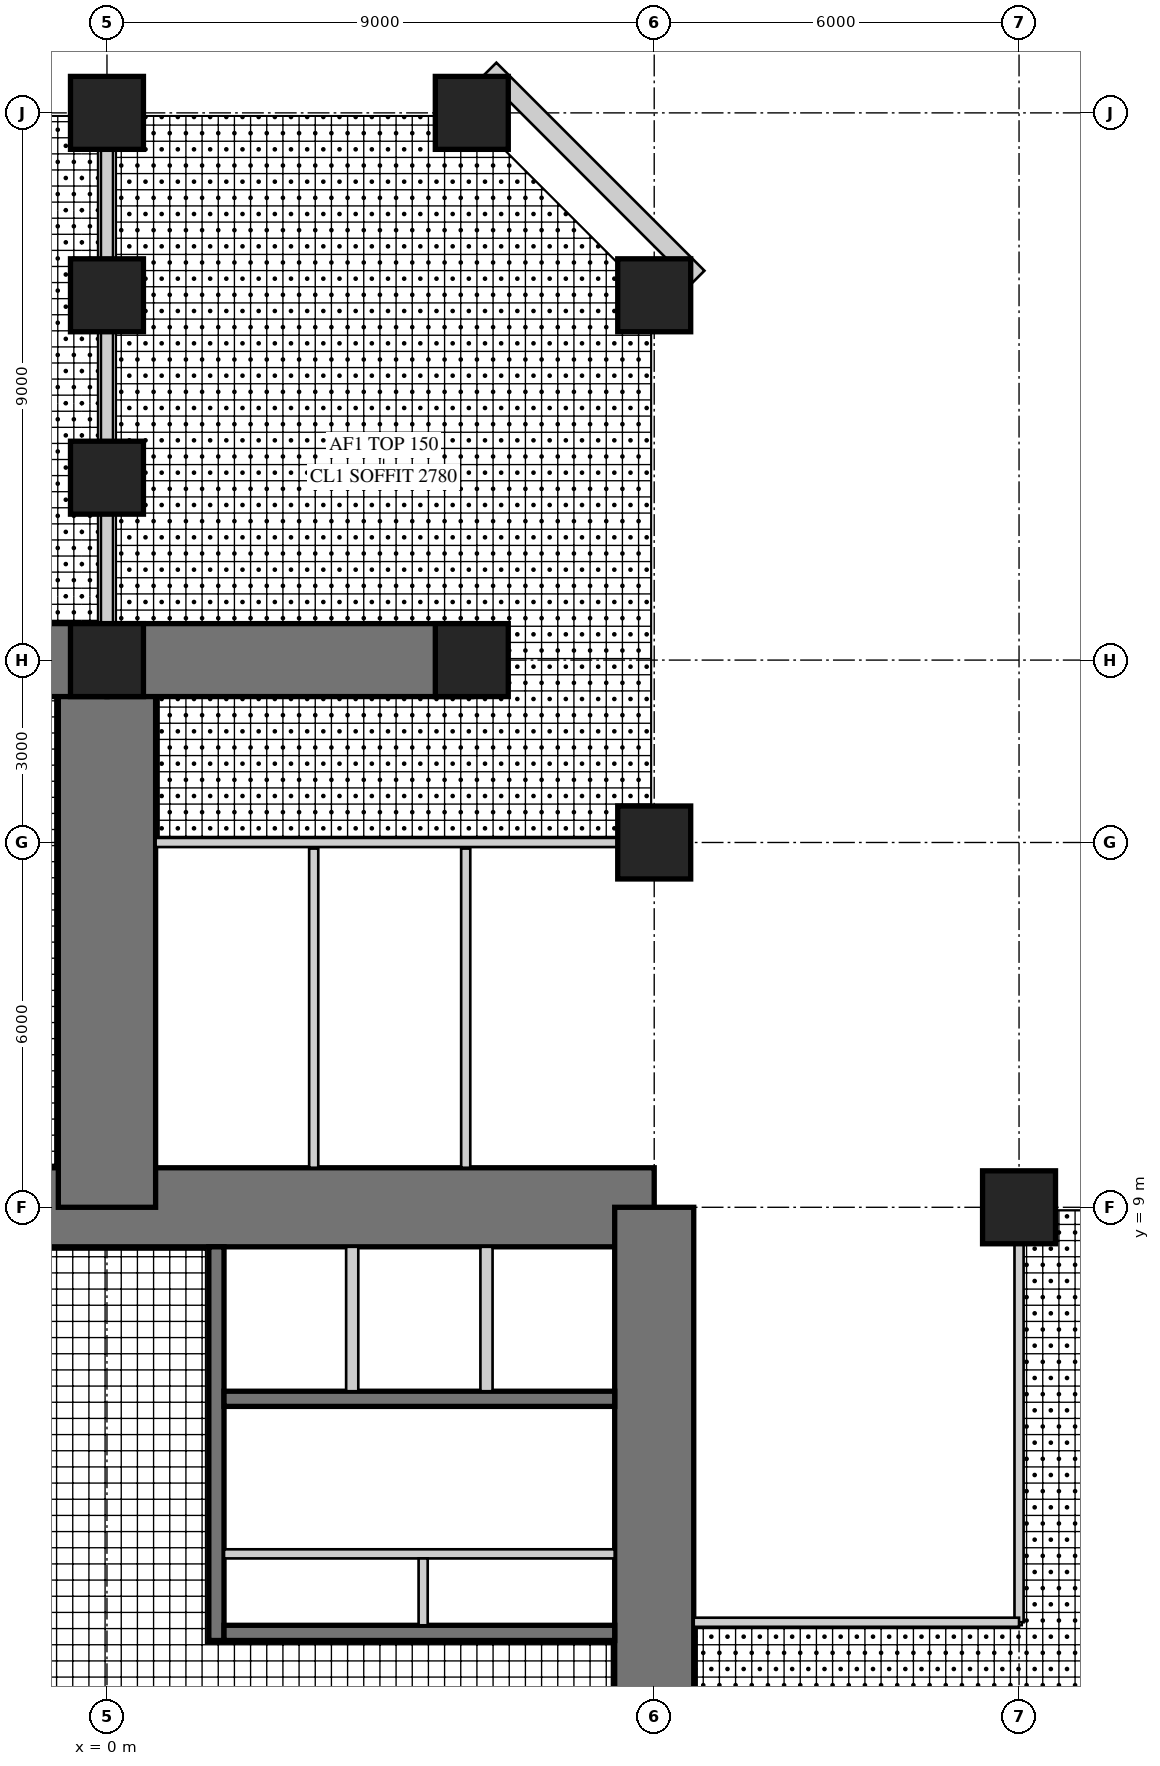
"""IFC4 building model, lengths in metres.
Left out: names, types, materials, properties, quantities, classifications, styles, units other than length and angle.
Written with IfcOpenShell. Run it as: python <this file> out.ifc"""

import sys

from ifc_helpers import new_model, si_unit, direction, frame, frame_2d, origin, origin_2d, place, context, subcontext, project, spatial, rectangle, hollow_rectangle, extrude, element, fill, save


model = new_model("IFC4")
c1 = context("Model", 3, precision=1e-05, world=origin(), true_north=direction((0.0, 1.0)))
c2 = subcontext(c1, "Body", "Model", "MODEL_VIEW")
j1 = project(units=[si_unit("LENGTHUNIT", "METRE"), si_unit("PLANEANGLEUNIT", "RADIAN")], contexts=[c1])
p1 = place(None, origin())
s1 = spatial("IfcSite", under=j1, at=p1, CompositionType="ELEMENT")
p2 = place(p1, origin())
s2 = spatial("IfcBuilding", under=s1, at=p2, CompositionType="ELEMENT")
p3 = place(p2, frame((0.0, 0.0, 71.5)))
s3 = spatial("IfcBuildingStorey", under=s2, at=p3, CompositionType="ELEMENT", Elevation=71.5)
p4 = place(p3, frame((9.0, 9.0, 0.0), z_axis=(0.0, 0.0, 1.0), x_axis=(-1.0, 0.0, 0.0)))
e1 = element("IfcWall", 1, at=p4, inside=s3, PredefinedType="SHEAR", context=c2, shape_type="SweptSolid", body=[
    extrude(rectangle(XDim=18.0, YDim=1.3, at=frame_2d((9.0, 0.0))), origin(), (0.0, 0.0, 1.0), 4.0),
])
p5 = place(p4, frame((9.8, 0.0, 0.0)))
e2 = element("IfcOpeningElement", 2, at=p5, cuts=e1, PredefinedType="OPENING", context=c2, shape_type="SweptSolid", body=[
    extrude(rectangle(XDim=1.0, YDim=2.4, at=frame_2d((0.5, 1.2))), frame((0.0, 0.66, 0.0), z_axis=(0.0, -1.0, 0.0), x_axis=(1.0, 0.0, 0.0)), (0.0, 0.0, 1.0), 1.32),
])
p6 = place(p3, frame((9.0, -9.0, 0.0), z_axis=(0.0, 0.0, 1.0), x_axis=(0.0, 1.0, 0.0)))
e3 = element("IfcWall", 3, at=p6, inside=s3, PredefinedType="SHEAR", context=c2, shape_type="SweptSolid", body=[
    extrude(rectangle(XDim=18.0, YDim=1.3, at=frame_2d((9.0, 0.0))), origin(), (0.0, 0.0, 1.0), 4.0),
])
p7 = place(p6, frame((9.8, 0.0, 0.0)))
e4 = element("IfcOpeningElement", 4, at=p7, cuts=e3, PredefinedType="OPENING", context=c2, shape_type="SweptSolid", body=[
    extrude(rectangle(XDim=1.0, YDim=2.4, at=frame_2d((0.5, 1.2))), frame((0.0, 0.66, 0.0), z_axis=(0.0, -1.0, 0.0), x_axis=(1.0, 0.0, 0.0)), (0.0, 0.0, 1.0), 1.32),
])
p8 = place(p3, frame((1.8, 1.875, 0.0), z_axis=(0.0, 0.0, 1.0), x_axis=(0.0, 1.0, 0.0)))
e5 = element("IfcWall", 5, at=p8, inside=s3, PredefinedType="SHEAR", context=c2, shape_type="SweptSolid", body=[
    extrude(rectangle(XDim=6.475, YDim=0.25, at=frame_2d((3.238, 0.0))), origin(), (0.0, 0.0, 1.0), 4.0),
])
p9 = place(p8, frame((1.875, 0.0, 0.0)))
e6 = element("IfcOpeningElement", 6, at=p9, cuts=e5, PredefinedType="OPENING", context=c2, shape_type="SweptSolid", body=[
    extrude(rectangle(XDim=1.6, YDim=2.4, at=frame_2d((0.8, 1.2))), frame((0.0, 0.135, 0.0), z_axis=(0.0, -1.0, 0.0), x_axis=(1.0, 0.0, 0.0)), (0.0, 0.0, 1.0), 0.27),
])
p10 = place(p3, frame((1.925, 2.0, 0.0), z_axis=(0.0, 0.0, 1.0), x_axis=(1.0, 0.0, 0.0)))
e7 = element("IfcWall", 7, at=p10, inside=s3, PredefinedType="SHEAR", context=c2, shape_type="SweptSolid", body=[
    extrude(rectangle(XDim=6.425, YDim=0.25, at=frame_2d((3.212, 0.0))), origin(), (0.0, 0.0, 1.0), 4.0),
])
p11 = place(p3, frame((1.925, 5.85, 0.0), z_axis=(0.0, 0.0, 1.0), x_axis=(1.0, 0.0, 0.0)))
e8 = element("IfcWall", 8, at=p11, inside=s3, PredefinedType="SHEAR", context=c2, shape_type="SweptSolid", body=[
    extrude(rectangle(XDim=6.425, YDim=0.25, at=frame_2d((3.212, 0.0))), origin(), (0.0, 0.0, 1.0), 4.0),
])
p12 = place(p11, frame((0.454, 0.0, 0.0)))
e9 = element("IfcOpeningElement", 9, at=p12, cuts=e8, PredefinedType="OPENING", context=c2, shape_type="SweptSolid", body=[
    extrude(rectangle(XDim=1.1, YDim=2.2, at=frame_2d((0.55, 1.1))), frame((0.0, 0.135, 0.0), z_axis=(0.0, -1.0, 0.0), x_axis=(1.0, 0.0, 0.0)), (0.0, 0.0, 1.0), 0.27),
])
p13 = place(p11, frame((2.663, 0.0, 0.0)))
e10 = element("IfcOpeningElement", 10, at=p13, cuts=e8, PredefinedType="OPENING", context=c2, shape_type="SweptSolid", body=[
    extrude(rectangle(XDim=1.1, YDim=2.2, at=frame_2d((0.55, 1.1))), frame((0.0, 0.135, 0.0), z_axis=(0.0, -1.0, 0.0), x_axis=(1.0, 0.0, 0.0)), (0.0, 0.0, 1.0), 0.27),
])
p14 = place(p11, frame((4.871, 0.0, 0.0)))
e11 = element("IfcOpeningElement", 11, at=p14, cuts=e8, PredefinedType="OPENING", context=c2, shape_type="SweptSolid", body=[
    extrude(rectangle(XDim=1.1, YDim=2.2, at=frame_2d((0.55, 1.1))), frame((0.0, 0.135, 0.0), z_axis=(0.0, -1.0, 0.0), x_axis=(1.0, 0.0, 0.0)), (0.0, 0.0, 1.0), 0.27),
])
p15 = place(p3, frame((1.925, 3.3, 0.0), z_axis=(0.0, 0.0, 1.0), x_axis=(1.0, 0.0, 0.0)))
e12 = element("IfcWall", 12, at=p15, inside=s3, PredefinedType="PARTITIONING", context=c2, shape_type="SweptSolid", body=[
    extrude(rectangle(XDim=6.425, YDim=0.15, at=frame_2d((3.212, 0.0))), origin(), (0.0, 0.0, 1.0), 4.0),
])
p16 = place(p15, frame((0.075, 0.0, 0.0)))
e13 = element("IfcOpeningElement", 13, at=p16, cuts=e12, PredefinedType="OPENING", context=c2, shape_type="SweptSolid", body=[
    extrude(rectangle(XDim=0.8, YDim=2.1, at=frame_2d((0.4, 1.05))), frame((0.0, 0.085, 0.0), z_axis=(0.0, -1.0, 0.0), x_axis=(1.0, 0.0, 0.0)), (0.0, 0.0, 1.0), 0.17),
])
p17 = place(p15, frame((3.675, 0.0, 0.0)))
e14 = element("IfcOpeningElement", 14, at=p17, cuts=e12, PredefinedType="OPENING", context=c2, shape_type="SweptSolid", body=[
    extrude(rectangle(XDim=0.8, YDim=2.1, at=frame_2d((0.4, 1.05))), frame((0.0, 0.085, 0.0), z_axis=(0.0, -1.0, 0.0), x_axis=(1.0, 0.0, 0.0)), (0.0, 0.0, 1.0), 0.17),
])
p18 = place(p3, frame((5.2, 2.125, 0.0), z_axis=(0.0, 0.0, 1.0), x_axis=(0.0, 1.0, 0.0)))
e15 = element("IfcWall", 15, at=p18, inside=s3, PredefinedType="PARTITIONING", context=c2, shape_type="SweptSolid", body=[
    extrude(rectangle(XDim=1.1, YDim=0.15, at=frame_2d((0.55, 0.0))), origin(), (0.0, 0.0, 1.0), 4.0),
])
for number, where, z_axis, x_axis in (
    (16, (4.033, 5.975, 0.0), (0.0, 0.0, 1.0), (0.0, 1.0, 0.0)),
    (17, (6.242, 5.975, 0.0), (0.0, 0.0, 1.0), (0.0, 1.0, 0.0)),
):
    element("IfcWall", number, at=place(p3, frame(where, z_axis=z_axis, x_axis=x_axis)), inside=s3, PredefinedType="PARTITIONING", context=c2, shape_type="SweptSolid", body=[
        extrude(rectangle(XDim=2.375, YDim=0.2, at=frame_2d((1.188, 0.0))), origin(), (0.0, 0.0, 1.0), 4.0),
    ])
p19 = place(p3, frame((0.0, 9.0, 0.0), z_axis=(0.0, 0.0, 1.0), x_axis=(0.0, 1.0, 0.0)))
e18 = element("IfcWall", 18, at=p19, inside=s3, PredefinedType="SHEAR", context=c2, shape_type="SweptSolid", body=[
    extrude(rectangle(XDim=9.0, YDim=1.6, at=frame_2d((4.5, 0.0))), origin(), (0.0, 0.0, 1.0), 4.0),
])
for number, where, z_axis, x_axis in (
    (19, (0.0, 18.0, 0.0), (0.0, 0.0, 1.0), (-1.0, 0.0, 0.0)),
    (20, (0.0, 18.0, 0.0), (0.0, 0.0, 1.0), (1.0, 0.0, 0.0)),
):
    element("IfcWall", number, at=place(p3, frame(where, z_axis=z_axis, x_axis=x_axis)), inside=s3, PredefinedType="SHEAR", context=c2, shape_type="SweptSolid", body=[
        extrude(rectangle(XDim=6.0, YDim=1.2, at=frame_2d((3.0, 0.0))), origin(), (0.0, 0.0, 1.0), 4.0),
    ])
for number, where, z_axis, x_axis in (
    (21, (9.0, 15.0, 0.0), (0.0, 0.0, 1.0), (1.0, 0.0, 0.0)),
    (22, (9.0, 24.0, 0.0), (0.0, 0.0, 1.0), (1.0, 0.0, 0.0)),
    (23, (6.0, 27.0, 0.0), (0.0, 0.0, 1.0), (1.0, 0.0, 0.0)),
    (24, (0.0, 27.0, 0.0), (0.0, 0.0, 1.0), (1.0, 0.0, 0.0)),
    (25, (15.0, 9.0, 0.0), (0.0, 0.0, 1.0), (1.0, 0.0, 0.0)),
    (26, (6.0, 18.0, 0.0), (0.0, 0.0, 1.0), (1.0, 0.0, 0.0)),
    (27, (0.0, 18.0, 0.0), (0.0, 0.0, 1.0), (1.0, 0.0, 0.0)),
    (28, (0.0, 21.0, 0.0), (0.0, 0.0, 1.0), (1.0, 0.0, 0.0)),
    (29, (0.0, 24.0, 0.0), (0.0, 0.0, 1.0), (1.0, 0.0, 0.0)),
):
    element("IfcColumn", number, at=place(p3, frame(where, z_axis=z_axis, x_axis=x_axis)), inside=s3, PredefinedType="COLUMN", context=c2, shape_type="SweptSolid", body=[
        extrude(rectangle(XDim=1.2, YDim=1.2, at=origin_2d()), origin(), (0.0, 0.0, 1.0), 4.0),
    ])
p20 = place(p3, frame((9.72, 24.298, 0.0), z_axis=(0.0, 0.0, 1.0), x_axis=(-0.707106781187, 0.707106781187, 0.0)))
e30 = element("IfcWall", 30, at=p20, inside=s3, PredefinedType="SOLIDWALL", context=c2, shape_type="SweptSolid", body=[
    extrude(rectangle(XDim=4.839, YDim=0.3, at=frame_2d((2.419, 0.0))), origin(), (0.0, 0.0, 1.0), 3.8),
])
p21 = place(p20, frame((1.969, 0.0, 0.3)))
e31 = element("IfcOpeningElement", 31, at=p21, cuts=e30, PredefinedType="OPENING", context=c2, shape_type="SweptSolid", body=[
    extrude(rectangle(XDim=0.9, YDim=2.4, at=frame_2d((0.45, 1.2))), frame((0.0, 0.16, 0.0), z_axis=(0.0, -1.0, 0.0), x_axis=(1.0, 0.0, 0.0)), (0.0, 0.0, 1.0), 0.32),
])
p22 = place(p3, frame((8.4, 15.0, 0.0), z_axis=(0.0, 0.0, 1.0), x_axis=(-1.0, 0.0, 0.0)))
e32 = element("IfcWall", 32, at=p22, inside=s3, PredefinedType="PARTITIONING", context=c2, shape_type="SweptSolid", body=[
    extrude(rectangle(XDim=7.6, YDim=0.15, at=frame_2d((3.8, 0.0))), origin(), (0.0, 0.0, 1.0), 2.95),
])
p23 = place(p22, frame((0.75, 0.0, 0.0)))
e33 = element("IfcOpeningElement", 33, at=p23, cuts=e32, PredefinedType="OPENING", context=c2, shape_type="SweptSolid", body=[
    extrude(rectangle(XDim=1.0, YDim=2.1, at=frame_2d((0.5, 1.05))), frame((0.0, 0.085, 0.0), z_axis=(0.0, -1.0, 0.0), x_axis=(1.0, 0.0, 0.0)), (0.0, 0.0, 1.0), 0.17),
])
p24 = place(p22, frame((3.25, 0.0, 0.0)))
e34 = element("IfcOpeningElement", 34, at=p24, cuts=e32, PredefinedType="OPENING", context=c2, shape_type="SweptSolid", body=[
    extrude(rectangle(XDim=1.0, YDim=2.1, at=frame_2d((0.5, 1.05))), frame((0.0, 0.085, 0.0), z_axis=(0.0, -1.0, 0.0), x_axis=(1.0, 0.0, 0.0)), (0.0, 0.0, 1.0), 0.17),
])
p25 = place(p22, frame((5.8, 0.0, 0.0)))
e35 = element("IfcOpeningElement", 35, at=p25, cuts=e32, PredefinedType="OPENING", context=c2, shape_type="SweptSolid", body=[
    extrude(rectangle(XDim=1.0, YDim=2.1, at=frame_2d((0.5, 1.05))), frame((0.0, 0.085, 0.0), z_axis=(0.0, -1.0, 0.0), x_axis=(1.0, 0.0, 0.0)), (0.0, 0.0, 1.0), 0.17),
])
p26 = place(p3, frame((3.4, 9.65, 0.0), z_axis=(0.0, 0.0, 1.0), x_axis=(0.0, 1.0, 0.0)))
e36 = element("IfcWall", 36, at=p26, inside=s3, PredefinedType="PARTITIONING", context=c2, shape_type="SweptSolid", body=[
    extrude(rectangle(XDim=5.25, YDim=0.15, at=frame_2d((2.625, 0.0))), origin(), (0.0, 0.0, 1.0), 3.8),
])
p27 = place(p3, frame((5.9, 9.65, 0.0), z_axis=(0.0, 0.0, 1.0), x_axis=(0.0, 1.0, 0.0)))
e37 = element("IfcWall", 37, at=p27, inside=s3, PredefinedType="PARTITIONING", context=c2, shape_type="SweptSolid", body=[
    extrude(rectangle(XDim=5.25, YDim=0.15, at=frame_2d((2.625, 0.0))), origin(), (0.0, 0.0, 1.0), 3.0),
])
p28 = place(p3, frame((15.0, 2.175, 0.0), z_axis=(0.0, 0.0, 1.0), x_axis=(0.0, 1.0, 0.0)))
e38 = element("IfcWall", 38, at=p28, inside=s3, PredefinedType="PARTITIONING", context=c2, shape_type="SweptSolid", body=[
    extrude(rectangle(XDim=6.225, YDim=0.15, at=frame_2d((3.112, 0.0))), origin(), (0.0, 0.0, 1.0), 2.95),
])
p29 = place(p28, frame((2.613, 0.0, 0.0)))
e39 = element("IfcOpeningElement", 39, at=p29, cuts=e38, PredefinedType="OPENING", context=c2, shape_type="SweptSolid", body=[
    extrude(rectangle(XDim=1.0, YDim=2.1, at=frame_2d((0.5, 1.05))), frame((0.0, 0.085, 0.0), z_axis=(0.0, -1.0, 0.0), x_axis=(1.0, 0.0, 0.0)), (0.0, 0.0, 1.0), 0.17),
])
p30 = place(p3, frame((9.65, 2.175, 0.0), z_axis=(0.0, 0.0, 1.0), x_axis=(1.0, 0.0, 0.0)))
e40 = element("IfcWall", 40, at=p30, inside=s3, PredefinedType="PARTITIONING", context=c2, shape_type="SweptSolid", body=[
    extrude(rectangle(XDim=5.35, YDim=0.15, at=frame_2d((2.675, 0.0))), origin(), (0.0, 0.0, 1.0), 3.8),
])
p31 = place(p3, frame((0.0, 18.0, 0.0), z_axis=(0.0, 0.0, 1.0), x_axis=(0.0, 1.0, 0.0)))
e41 = element("IfcWall", 41, at=p31, inside=s3, PredefinedType="SOLIDWALL", context=c2, shape_type="SweptSolid", body=[
    extrude(rectangle(XDim=3.0, YDim=0.2, at=frame_2d((1.5, 0.0))), origin(), (0.0, 0.0, 1.0), 3.8),
])
p32 = place(p31, frame((0.9, 0.0, 0.0)))
e42 = element("IfcOpeningElement", 42, at=p32, cuts=e41, PredefinedType="OPENING", context=c2, shape_type="SweptSolid", body=[
    extrude(rectangle(XDim=1.0, YDim=2.2, at=frame_2d((0.5, 1.1))), frame((0.0, 0.11, 0.0), z_axis=(0.0, -1.0, 0.0), x_axis=(1.0, 0.0, 0.0)), (0.0, 0.0, 1.0), 0.22),
])
p33 = place(p3, frame((0.0, 21.0, 0.0), z_axis=(0.0, 0.0, 1.0), x_axis=(0.0, 1.0, 0.0)))
e43 = element("IfcWall", 43, at=p33, inside=s3, PredefinedType="SOLIDWALL", context=c2, shape_type="SweptSolid", body=[
    extrude(rectangle(XDim=6.0, YDim=0.2, at=frame_2d((3.0, 0.0))), origin(), (0.0, 0.0, 1.0), 2.9),
])
p34 = place(p21, origin())
e44 = element("IfcWindow", 44, at=p34, inside=s3, PartitioningType="SINGLE_PANEL", PredefinedType="WINDOW", context=c2, shape_type="SweptSolid", body=[
    extrude(hollow_rectangle(XDim=0.9, YDim=2.4, WallThickness=0.06, at=frame_2d((0.45, 1.2))), frame((0.0, 0.03, 0.0), z_axis=(0.0, -1.0, 0.0), x_axis=(1.0, 0.0, 0.0)), (0.0, 0.0, 1.0), 0.06),
    extrude(rectangle(XDim=0.779, YDim=2.279, at=frame_2d((0.45, 1.2))), frame((0.0, 0.03, 0.0), z_axis=(0.0, -1.0, 0.0), x_axis=(1.0, 0.0, 0.0)), (0.0, 0.0, 1.0), 0.06),
])
fill(e31, e44)
p35 = place(p23, origin())
e45 = element("IfcDoor", 45, at=p35, inside=s3, OperationType="SINGLE_SWING_RIGHT", PredefinedType="DOOR", context=c2, shape_type="SweptSolid", body=[
    extrude(rectangle(XDim=1.0, YDim=2.1, at=frame_2d((0.5, 1.05))), frame((0.0, 0.025, 0.0), z_axis=(0.0, -1.0, 0.0), x_axis=(1.0, 0.0, 0.0)), (0.0, 0.0, 1.0), 0.05),
])
fill(e33, e45)
p36 = place(p24, origin())
e46 = element("IfcDoor", 46, at=p36, inside=s3, OperationType="SINGLE_SWING_LEFT", PredefinedType="DOOR", context=c2, shape_type="SweptSolid", body=[
    extrude(rectangle(XDim=1.0, YDim=2.1, at=frame_2d((0.5, 1.05))), frame((0.0, 0.025, 0.0), z_axis=(0.0, -1.0, 0.0), x_axis=(1.0, 0.0, 0.0)), (0.0, 0.0, 1.0), 0.05),
])
fill(e34, e46)
p37 = place(p25, origin())
e47 = element("IfcDoor", 47, at=p37, inside=s3, OperationType="SINGLE_SWING_LEFT", PredefinedType="DOOR", context=c2, shape_type="SweptSolid", body=[
    extrude(rectangle(XDim=1.0, YDim=2.1, at=frame_2d((0.5, 1.05))), frame((0.0, 0.025, 0.0), z_axis=(0.0, -1.0, 0.0), x_axis=(1.0, 0.0, 0.0)), (0.0, 0.0, 1.0), 0.05),
])
fill(e35, e47)
p38 = place(p29, origin())
e48 = element("IfcDoor", 48, at=p38, inside=s3, OperationType="SINGLE_SWING_LEFT", PredefinedType="DOOR", context=c2, shape_type="SweptSolid", body=[
    extrude(rectangle(XDim=1.0, YDim=2.1, at=frame_2d((0.5, 1.05))), frame((0.0, 0.025, 0.0), z_axis=(0.0, -1.0, 0.0), x_axis=(1.0, 0.0, 0.0)), (0.0, 0.0, 1.0), 0.05),
])
fill(e39, e48)
p39 = place(p32, frame((1.0, 0.0, 0.0), z_axis=(0.0, 0.0, 1.0), x_axis=(-1.0, 0.0, 0.0)))
e49 = element("IfcDoor", 49, at=p39, inside=s3, OperationType="SINGLE_SWING_RIGHT", PredefinedType="DOOR", context=c2, shape_type="SweptSolid", body=[
    extrude(rectangle(XDim=1.0, YDim=2.2, at=frame_2d((0.5, 1.1))), frame((0.0, 0.025, 0.0), z_axis=(0.0, -1.0, 0.0), x_axis=(1.0, 0.0, 0.0)), (0.0, 0.0, 1.0), 0.05),
])
fill(e42, e49)
p40 = place(p5, frame((1.0, 0.0, 0.0), z_axis=(0.0, 0.0, 1.0), x_axis=(-1.0, 0.0, 0.0)))
e50 = element("IfcDoor", 50, at=p40, inside=s3, OperationType="SINGLE_SWING_RIGHT", PredefinedType="DOOR", context=c2, shape_type="SweptSolid", body=[
    extrude(rectangle(XDim=1.0, YDim=2.4, at=frame_2d((0.5, 1.2))), frame((0.0, -0.005, 0.0), z_axis=(0.0, -1.0, 0.0), x_axis=(1.0, 0.0, 0.0)), (0.0, 0.0, 1.0), 0.05),
])
fill(e2, e50)
p41 = place(p7, frame((1.0, 0.0, 0.0), z_axis=(0.0, 0.0, 1.0), x_axis=(-1.0, 0.0, 0.0)))
e51 = element("IfcDoor", 51, at=p41, inside=s3, OperationType="SINGLE_SWING_RIGHT", PredefinedType="DOOR", context=c2, shape_type="SweptSolid", body=[
    extrude(rectangle(XDim=1.0, YDim=2.4, at=frame_2d((0.5, 1.2))), frame((0.0, -0.005, 0.0), z_axis=(0.0, -1.0, 0.0), x_axis=(1.0, 0.0, 0.0)), (0.0, 0.0, 1.0), 0.05),
])
fill(e4, e51)
p42 = place(p12, origin())
e52 = element("IfcDoor", 52, at=p42, inside=s3, OperationType="DOUBLE_DOOR_SLIDING", PredefinedType="DOOR", context=c2, shape_type="SweptSolid", body=[
    extrude(rectangle(XDim=1.1, YDim=2.2, at=frame_2d((0.55, 1.1))), frame((0.0, 0.025, 0.0), z_axis=(0.0, -1.0, 0.0), x_axis=(1.0, 0.0, 0.0)), (0.0, 0.0, 1.0), 0.05),
])
fill(e9, e52)
p43 = place(p13, origin())
e53 = element("IfcDoor", 53, at=p43, inside=s3, OperationType="DOUBLE_DOOR_SLIDING", PredefinedType="DOOR", context=c2, shape_type="SweptSolid", body=[
    extrude(rectangle(XDim=1.1, YDim=2.2, at=frame_2d((0.55, 1.1))), frame((0.0, 0.025, 0.0), z_axis=(0.0, -1.0, 0.0), x_axis=(1.0, 0.0, 0.0)), (0.0, 0.0, 1.0), 0.05),
])
fill(e10, e53)
p44 = place(p14, origin())
e54 = element("IfcDoor", 54, at=p44, inside=s3, OperationType="DOUBLE_DOOR_SLIDING", PredefinedType="DOOR", context=c2, shape_type="SweptSolid", body=[
    extrude(rectangle(XDim=1.1, YDim=2.2, at=frame_2d((0.55, 1.1))), frame((0.0, 0.025, 0.0), z_axis=(0.0, -1.0, 0.0), x_axis=(1.0, 0.0, 0.0)), (0.0, 0.0, 1.0), 0.05),
])
fill(e11, e54)
p45 = place(p9, origin())
e55 = element("IfcDoor", 55, at=p45, inside=s3, OperationType="DOUBLE_DOOR_DOUBLE_SWING", PredefinedType="DOOR", context=c2, shape_type="SweptSolid", body=[
    extrude(rectangle(XDim=1.6, YDim=2.4, at=frame_2d((0.8, 1.2))), frame((0.0, 0.025, 0.0), z_axis=(0.0, -1.0, 0.0), x_axis=(1.0, 0.0, 0.0)), (0.0, 0.0, 1.0), 0.05),
])
fill(e6, e55)
p46 = place(p16, frame((0.8, 0.0, 0.0), z_axis=(0.0, 0.0, 1.0), x_axis=(-1.0, 0.0, 0.0)))
e56 = element("IfcDoor", 56, at=p46, inside=s3, OperationType="SINGLE_SWING_RIGHT", PredefinedType="DOOR", context=c2, shape_type="SweptSolid", body=[
    extrude(rectangle(XDim=0.8, YDim=2.1, at=frame_2d((0.4, 1.05))), frame((0.0, 0.025, 0.0), z_axis=(0.0, -1.0, 0.0), x_axis=(1.0, 0.0, 0.0)), (0.0, 0.0, 1.0), 0.05),
])
fill(e13, e56)
p47 = place(p17, frame((0.8, 0.0, 0.0), z_axis=(0.0, 0.0, 1.0), x_axis=(-1.0, 0.0, 0.0)))
e57 = element("IfcDoor", 57, at=p47, inside=s3, OperationType="SINGLE_SWING_RIGHT", PredefinedType="DOOR", context=c2, shape_type="SweptSolid", body=[
    extrude(rectangle(XDim=0.8, YDim=2.1, at=frame_2d((0.4, 1.05))), frame((0.0, 0.025, 0.0), z_axis=(0.0, -1.0, 0.0), x_axis=(1.0, 0.0, 0.0)), (0.0, 0.0, 1.0), 0.05),
])
fill(e14, e57)
save(model, sys.argv[1])
